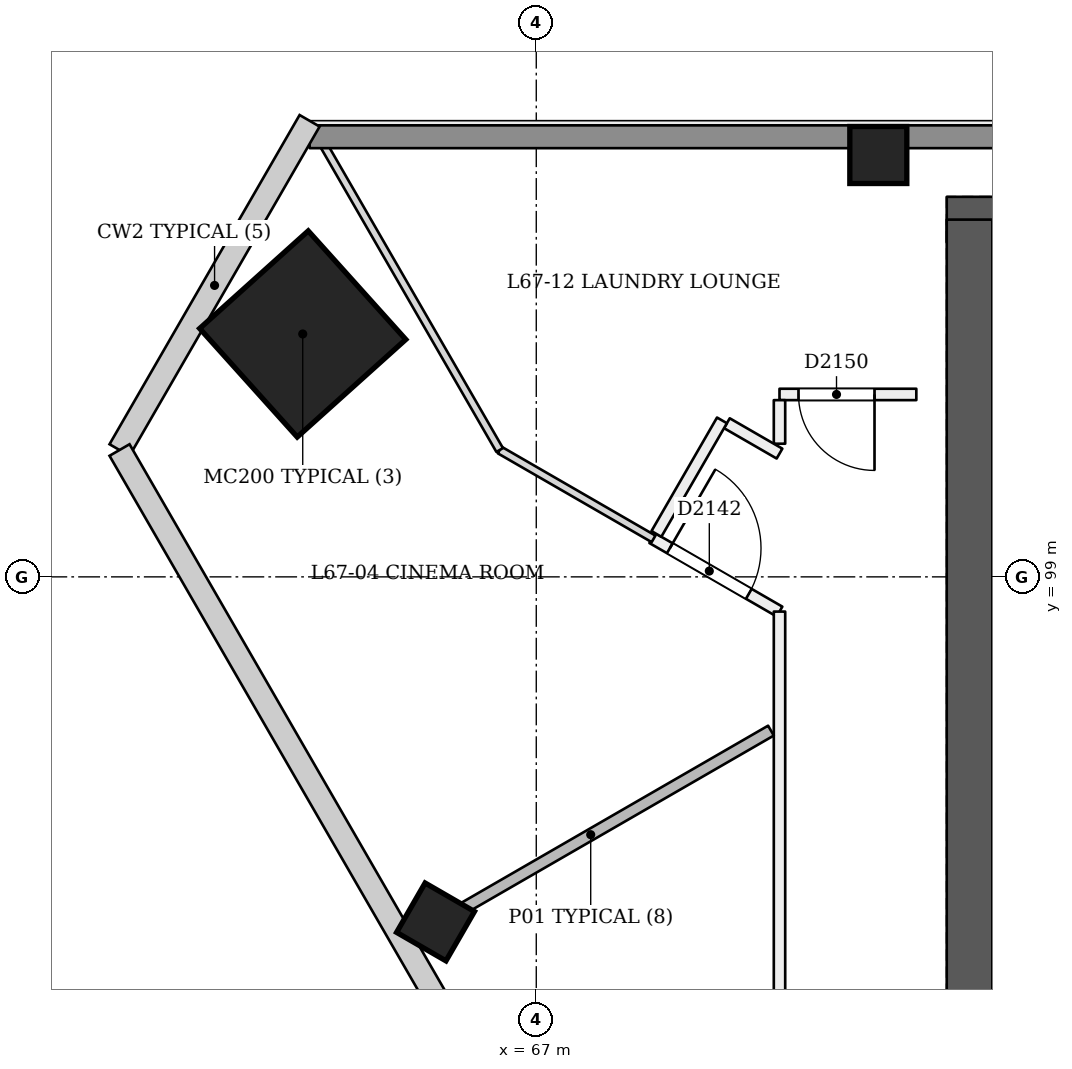
"""IFC4 building model, lengths in metres.
Left out: names, types, materials, properties, quantities, classifications, styles, units other than length and angle.
Written with IfcOpenShell. Run it as: python <this file> out.ifc"""

import sys

from ifc_helpers import new_model, si_unit, direction, frame, frame_2d, origin, origin_2d, place, context, subcontext, project, spatial, rectangle, extrude, element, fill, save


model = new_model("IFC4")
c1 = context("Model", 3, precision=1e-05, world=origin(), true_north=direction((0.0, 1.0)))
c2 = subcontext(c1, "Body", "Model", "MODEL_VIEW")
j1 = project(units=[si_unit("LENGTHUNIT", "METRE"), si_unit("PLANEANGLEUNIT", "RADIAN")], contexts=[c1])
p1 = place(None, origin())
s1 = spatial("IfcSite", under=j1, at=p1, CompositionType="ELEMENT")
p2 = place(p1, origin())
s2 = spatial("IfcBuilding", under=s1, at=p2, CompositionType="ELEMENT")
p3 = place(p2, frame((0.0, 0.0, 260.8)))
s3 = spatial("IfcBuildingStorey", under=s2, at=p3, CompositionType="ELEMENT", Elevation=260.8)
p4 = place(p3, frame((97.3, 103.7, 0.0), z_axis=(0.0, 0.0, 1.0), x_axis=(-1.0, 0.0, 0.0)))
e1 = element("IfcWall", 1, at=p4, inside=s3, PredefinedType="SHEAR", context=c2, shape_type="SweptSolid", body=[
    extrude(rectangle(XDim=24.9, YDim=0.6, at=frame_2d((12.45, 0.0))), origin(), (0.0, 0.0, 1.0), 3.6),
])
p5 = place(p3, frame((72.7, 103.7, 0.0), z_axis=(0.0, 0.0, 1.0), x_axis=(0.0, -1.0, 0.0)))
e2 = element("IfcWall", 2, at=p5, inside=s3, PredefinedType="SHEAR", context=c2, shape_type="SweptSolid", body=[
    extrude(rectangle(XDim=10.9, YDim=0.6, at=frame_2d((5.45, 0.0))), origin(), (0.0, 0.0, 1.0), 3.6),
])
p6 = place(p3, frame((63.894, 102.184, 0.0), z_axis=(0.028335986449, 0.009287153453, 0.999555311452), x_axis=(-0.866551221007, 0.498689979124, 0.019932036842)))
e3 = element("IfcColumn", 3, at=p6, inside=s3, PredefinedType="COLUMN", context=c2, shape_type="SweptSolid", body=[
    extrude(rectangle(XDim=1.92, YDim=1.92, at=origin_2d()), origin(), (0.0, 0.0, 1.0), 3.602),
])
p7 = place(p3, frame((71.5, 104.55, 0.0), z_axis=(0.0, 0.0, 1.0), x_axis=(1.0, 0.0, 0.0)))
e4 = element("IfcColumn", 4, at=p7, inside=s3, PredefinedType="COLUMN", context=c2, shape_type="SweptSolid", body=[
    extrude(rectangle(XDim=0.75, YDim=0.75, at=origin_2d()), origin(), (0.0, 0.0, 1.0), 3.6),
])
p8 = place(p3, frame((65.647, 94.413, -0.023), z_axis=(0.022222910879, 0.038415824599, 0.999014697916), x_axis=(-0.866021313636, -0.498527687654, 0.038434736505)))
e5 = element("IfcColumn", 5, at=p8, inside=s3, PredefinedType="COLUMN", context=c2, shape_type="SweptSolid", body=[
    extrude(rectangle(XDim=0.75, YDim=0.75, at=origin_2d()), origin(), (0.0, 0.0, 1.0), 3.604),
])
p9 = place(p3, frame((68.526, 99.51, 0.0), z_axis=(0.0, 0.0, 1.0), x_axis=(0.865996321171, -0.50005036918, 0.0)))
e6 = element("IfcWall", 6, at=p9, inside=s3, PredefinedType="PARTITIONING", context=c2, shape_type="SweptSolid", body=[
    extrude(rectangle(XDim=1.933, YDim=0.15, at=frame_2d((0.967, 0.0))), origin(), (0.0, 0.0, 1.0), 3.2),
])
p10 = place(p9, frame((0.267, 0.0, 0.0)))
e7 = element("IfcOpeningElement", 7, at=p10, cuts=e6, PredefinedType="OPENING", context=c2, shape_type="SweptSolid", body=[
    extrude(rectangle(XDim=1.2, YDim=2.1, at=frame_2d((0.6, 1.05))), frame((0.0, 0.085, 0.0), z_axis=(0.0, -1.0, 0.0), x_axis=(1.0, 0.0, 0.0)), (0.0, 0.0, 1.0), 0.171),
])
p11 = place(p3, frame((70.2, 98.543, 0.0), z_axis=(0.0, 0.0, 1.0), x_axis=(0.0, -1.0, 0.0)))
e8 = element("IfcWall", 8, at=p11, inside=s3, PredefinedType="PARTITIONING", context=c2, shape_type="SweptSolid", body=[
    extrude(rectangle(XDim=7.943, YDim=0.15, at=frame_2d((3.972, 0.0))), origin(), (0.0, 0.0, 1.0), 3.2),
])
p12 = place(p3, frame((72.0, 101.4, 0.0), z_axis=(0.0, 0.0, 1.0), x_axis=(-1.0, 0.0, 0.0)))
e9 = element("IfcWall", 9, at=p12, inside=s3, PredefinedType="PARTITIONING", context=c2, shape_type="SweptSolid", body=[
    extrude(rectangle(XDim=1.8, YDim=0.15, at=frame_2d((0.9, 0.0))), origin(), (0.0, 0.0, 1.0), 3.2),
])
p13 = place(p12, frame((0.55, 0.0, 0.0)))
e10 = element("IfcOpeningElement", 10, at=p13, cuts=e9, PredefinedType="OPENING", context=c2, shape_type="SweptSolid", body=[
    extrude(rectangle(XDim=1.0, YDim=2.1, at=frame_2d((0.5, 1.05))), frame((0.0, 0.085, 0.0), z_axis=(0.0, -1.0, 0.0), x_axis=(1.0, 0.0, 0.0)), (0.0, 0.0, 1.0), 0.171),
])
p14 = place(p3, frame((70.2, 101.325, 0.0), z_axis=(0.0, 0.0, 1.0), x_axis=(0.0, -1.0, 0.0)))
e11 = element("IfcWall", 11, at=p14, inside=s3, PredefinedType="PARTITIONING", context=c2, shape_type="SweptSolid", body=[
    extrude(rectangle(XDim=0.573, YDim=0.15, at=frame_2d((0.287, 0.0))), origin(), (0.0, 0.0, 1.0), 3.2),
])
p15 = place(p3, frame((70.2, 100.622, 0.0), z_axis=(0.0, 0.0, 1.0), x_axis=(-0.86612963205, 0.499819427878, 0.0)))
e12 = element("IfcWall", 12, at=p15, inside=s3, PredefinedType="PARTITIONING", context=c2, shape_type="SweptSolid", body=[
    extrude(rectangle(XDim=0.799, YDim=0.15, at=frame_2d((0.399, 0.0))), origin(), (0.0, 0.0, 1.0), 3.2),
])
p16 = place(p3, frame((69.443, 101.059, 0.0), z_axis=(0.0, 0.0, 1.0), x_axis=(-0.499914405916, -0.866074815912, 0.0)))
e13 = element("IfcWall", 13, at=p16, inside=s3, PredefinedType="PARTITIONING", context=c2, shape_type="SweptSolid", body=[
    extrude(rectangle(XDim=1.725, YDim=0.15, at=frame_2d((0.862, 0.0))), origin(), (0.0, 0.0, 1.0), 3.2),
])
p17 = place(p3, frame((65.345, 94.239, 0.0), z_axis=(0.0, 0.0, 1.0), x_axis=(0.866025963225, 0.49999903102, 0.0)))
e14 = element("IfcWall", 14, at=p17, inside=s3, PredefinedType="PARTITIONING", context=c2, shape_type="SweptSolid", body=[
    extrude(rectangle(XDim=5.476, YDim=0.15, at=frame_2d((2.738, 0.0))), origin(), (0.0, 0.0, 1.0), 2.7),
])
p18 = place(p3, frame((68.543, 99.5, 0.0), z_axis=(0.0, 0.0, 1.0), x_axis=(-0.866042970182, 0.499969572873, 0.0)))
e15 = element("IfcWall", 15, at=p18, inside=s3, PredefinedType="PARTITIONING", context=c2, shape_type="SweptSolid", body=[
    extrude(rectangle(XDim=2.338, YDim=0.1, at=frame_2d((1.169, 0.0))), origin(), (0.0, 0.0, 1.0), 3.2),
])
p19 = place(p3, frame((66.519, 100.669, 0.0), z_axis=(0.0, 0.0, 1.0), x_axis=(-0.499997844476, 0.866026648273, 0.0)))
e16 = element("IfcWall", 16, at=p19, inside=s3, PredefinedType="PARTITIONING", context=c2, shape_type="SweptSolid", body=[
    extrude(rectangle(XDim=4.886, YDim=0.1, at=frame_2d((2.443, 0.0))), origin(), (0.0, 0.0, 1.0), 2.7),
])
p20 = place(p3, frame((64.018, 104.79, 0.0), z_axis=(0.0, 0.0, 1.0), x_axis=(1.0, 0.0, 0.0)))
e17 = element("IfcWall", 17, at=p20, inside=s3, PredefinedType="SOLIDWALL", context=c2, shape_type="SweptSolid", body=[
    extrude(rectangle(XDim=41.964, YDim=0.3, at=frame_2d((20.982, 0.0))), origin(), (0.0, 0.0, 1.0), 2.7),
])
p21 = place(p10, origin())
e18 = element("IfcDoor", 18, at=p21, inside=s3, OperationType="SINGLE_SWING_LEFT", PredefinedType="NOTDEFINED", context=c2, shape_type="SweptSolid", body=[
    extrude(rectangle(XDim=1.2, YDim=2.1, at=frame_2d((0.6, 1.05))), frame((0.0, 0.025, 0.0), z_axis=(0.0, -1.0, 0.0), x_axis=(1.0, 0.0, 0.0)), (0.0, 0.0, 1.0), 0.05),
])
fill(e7, e18)
p22 = place(p13, origin())
e19 = element("IfcDoor", 19, at=p22, inside=s3, OperationType="SINGLE_SWING_LEFT", PredefinedType="NOTDEFINED", context=c2, shape_type="SweptSolid", body=[
    extrude(rectangle(XDim=1.0, YDim=2.1, at=frame_2d((0.5, 1.05))), frame((0.0, 0.025, 0.0), z_axis=(0.0, -1.0, 0.0), x_axis=(1.0, 0.0, 0.0)), (0.0, 0.0, 1.0), 0.05),
])
fill(e10, e19)
save(model, sys.argv[1])
